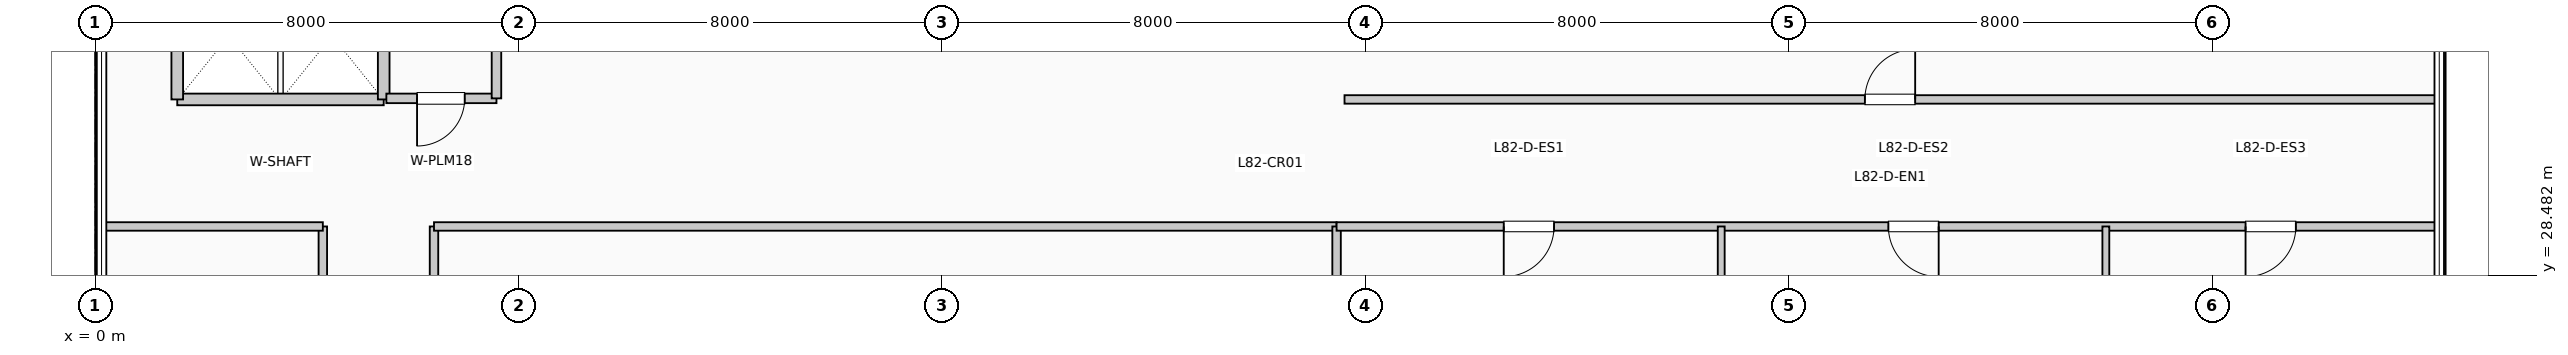
"""IFC4 building model, lengths in metres.
Left out: names, types, materials, properties, quantities, classifications, styles, units other than length and angle.
Written with IfcOpenShell. Run it as: python <this file> out.ifc"""

import sys

from ifc_helpers import new_model, si_unit, direction, frame, frame_2d, origin, place, context, subcontext, project, spatial, rectangle, extrude, element, fill, save


model = new_model("IFC4")
c1 = context("Model", 3, precision=1e-05, world=origin(), true_north=direction((0.0, 1.0)))
c2 = subcontext(c1, "Body", "Model", "MODEL_VIEW")
j1 = project(units=[si_unit("LENGTHUNIT", "METRE"), si_unit("PLANEANGLEUNIT", "RADIAN")], contexts=[c1])
p1 = place(None, origin())
s1 = spatial("IfcSite", under=j1, at=p1, CompositionType="ELEMENT")
p2 = place(p1, origin())
s2 = spatial("IfcBuilding", under=s1, at=p2, CompositionType="ELEMENT")
p3 = place(p2, frame((0.0, 0.0, 335.61)))
s3 = spatial("IfcBuildingStorey", under=s2, at=p3, CompositionType="ELEMENT", Elevation=335.61)
p4 = place(p3, frame((1.55, 31.8, 0.0), z_axis=(0.0, 0.0, 1.0), x_axis=(1.0, 0.0, 0.0)))
e1 = element("IfcWall", 1, at=p4, inside=s3, PredefinedType="PARTITIONING", context=c2, shape_type="SweptSolid", body=[
    extrude(rectangle(XDim=3.9, YDim=0.22, at=frame_2d((1.95, 0.0))), origin(), (0.0, 0.0, 1.0), 3.74),
])
for number, where, z_axis, x_axis in (
    (2, (1.55, 31.8, 0.0), (0.0, 0.0, 1.0), (0.0, 1.0, 0.0)),
    (3, (5.45, 31.8, 0.0), (0.0, 0.0, 1.0), (0.0, 1.0, 0.0)),
):
    element("IfcWall", number, at=place(p3, frame(where, z_axis=z_axis, x_axis=x_axis)), inside=s3, PredefinedType="PARTITIONING", context=c2, shape_type="SweptSolid", body=[
        extrude(rectangle(XDim=2.38, YDim=0.22, at=frame_2d((1.19, 0.0))), origin(), (0.0, 0.0, 1.0), 3.74),
    ])
p5 = place(p3, frame((5.5, 31.82, 0.0), z_axis=(0.0, 0.0, 1.0), x_axis=(1.0, 0.0, 0.0)))
e4 = element("IfcWall", 4, at=p5, inside=s3, PredefinedType="PLUMBINGWALL", context=c2, shape_type="SweptSolid", body=[
    extrude(rectangle(XDim=2.08, YDim=0.18, at=frame_2d((1.04, 0.0))), origin(), (0.0, 0.0, 1.0), 3.74),
])
p6 = place(p5, frame((1.48, 0.0, 0.0), z_axis=(0.0, 0.0, 1.0), x_axis=(-1.0, 0.0, 0.0)))
e5 = element("IfcOpeningElement", 5, at=p6, cuts=e4, PredefinedType="OPENING", context=c2, shape_type="SweptSolid", body=[
    extrude(rectangle(XDim=0.9, YDim=2.1, at=frame_2d((0.45, 1.05))), frame((0.0, 0.1, 0.0), z_axis=(0.0, -1.0, 0.0), x_axis=(1.0, 0.0, 0.0)), (0.0, 0.0, 1.0), 0.2),
])
p7 = place(p3, frame((7.58, 31.82, 0.0), z_axis=(0.0, 0.0, 1.0), x_axis=(0.0, 1.0, 0.0)))
e6 = element("IfcWall", 6, at=p7, inside=s3, PredefinedType="PLUMBINGWALL", context=c2, shape_type="SweptSolid", body=[
    extrude(rectangle(XDim=2.36, YDim=0.18, at=frame_2d((1.18, 0.0))), origin(), (0.0, 0.0, 1.0), 3.74),
])
p8 = place(p3, frame((4.3, 10.19, 0.0), z_axis=(0.0, 0.0, 1.0), x_axis=(0.0, 1.0, 0.0)))
e7 = element("IfcWall", 7, at=p8, inside=s3, PredefinedType="PARTITIONING", context=c2, shape_type="SweptSolid", body=[
    extrude(rectangle(XDim=19.21, YDim=0.16, at=frame_2d((9.605, 0.0))), origin(), (0.0, 0.0, 1.0), 3.74),
])
p9 = place(p8, frame((5.085, 0.0, 0.0), z_axis=(0.0, 0.0, 1.0), x_axis=(-1.0, 0.0, 0.0)))
e8 = element("IfcOpeningElement", 8, at=p9, cuts=e7, PredefinedType="OPENING", context=c2, shape_type="SweptSolid", body=[
    extrude(rectangle(XDim=0.95, YDim=2.15, at=frame_2d((0.475, 1.075))), frame((0.0, 0.09, 0.0), z_axis=(0.0, -1.0, 0.0), x_axis=(1.0, 0.0, 0.0)), (0.0, 0.0, 1.0), 0.18),
])
p10 = place(p8, frame((14.69, 0.0, 0.0), z_axis=(0.0, 0.0, 1.0), x_axis=(-1.0, 0.0, 0.0)))
e9 = element("IfcOpeningElement", 9, at=p10, cuts=e7, PredefinedType="OPENING", context=c2, shape_type="SweptSolid", body=[
    extrude(rectangle(XDim=0.95, YDim=2.15, at=frame_2d((0.475, 1.075))), frame((0.0, 0.09, 0.0), z_axis=(0.0, -1.0, 0.0), x_axis=(1.0, 0.0, 0.0)), (0.0, 0.0, 1.0), 0.18),
])
p11 = place(p3, frame((6.4, 10.19, 0.0), z_axis=(0.0, 0.0, 1.0), x_axis=(0.0, 1.0, 0.0)))
e10 = element("IfcWall", 10, at=p11, inside=s3, PredefinedType="PARTITIONING", context=c2, shape_type="SweptSolid", body=[
    extrude(rectangle(XDim=19.21, YDim=0.16, at=frame_2d((9.605, 0.0))), origin(), (0.0, 0.0, 1.0), 3.74),
])
p12 = place(p11, frame((1.35, 0.0, 0.0)))
e11 = element("IfcOpeningElement", 11, at=p12, cuts=e10, PredefinedType="OPENING", context=c2, shape_type="SweptSolid", body=[
    extrude(rectangle(XDim=0.95, YDim=2.15, at=frame_2d((0.475, 1.075))), frame((0.0, 0.09, 0.0), z_axis=(0.0, -1.0, 0.0), x_axis=(1.0, 0.0, 0.0)), (0.0, 0.0, 1.0), 0.18),
])
p13 = place(p11, frame((5.096, 0.0, 0.0)))
e12 = element("IfcOpeningElement", 12, at=p13, cuts=e10, PredefinedType="OPENING", context=c2, shape_type="SweptSolid", body=[
    extrude(rectangle(XDim=0.95, YDim=2.15, at=frame_2d((0.475, 1.075))), frame((0.0, 0.09, 0.0), z_axis=(0.0, -1.0, 0.0), x_axis=(1.0, 0.0, 0.0)), (0.0, 0.0, 1.0), 0.18),
])
p14 = place(p11, frame((9.034, 0.0, 0.0)))
e13 = element("IfcOpeningElement", 13, at=p14, cuts=e10, PredefinedType="OPENING", context=c2, shape_type="SweptSolid", body=[
    extrude(rectangle(XDim=0.95, YDim=2.15, at=frame_2d((0.475, 1.075))), frame((0.0, 0.09, 0.0), z_axis=(0.0, -1.0, 0.0), x_axis=(1.0, 0.0, 0.0)), (0.0, 0.0, 1.0), 0.18),
])
p15 = place(p11, frame((12.972, 0.0, 0.0)))
e14 = element("IfcOpeningElement", 14, at=p15, cuts=e10, PredefinedType="OPENING", context=c2, shape_type="SweptSolid", body=[
    extrude(rectangle(XDim=0.95, YDim=2.15, at=frame_2d((0.475, 1.075))), frame((0.0, 0.09, 0.0), z_axis=(0.0, -1.0, 0.0), x_axis=(1.0, 0.0, 0.0)), (0.0, 0.0, 1.0), 0.18),
])
p16 = place(p11, frame((16.814, 0.0, 0.0)))
e15 = element("IfcOpeningElement", 15, at=p16, cuts=e10, PredefinedType="OPENING", context=c2, shape_type="SweptSolid", body=[
    extrude(rectangle(XDim=0.95, YDim=2.15, at=frame_2d((0.475, 1.075))), frame((0.0, 0.09, 0.0), z_axis=(0.0, -1.0, 0.0), x_axis=(1.0, 0.0, 0.0)), (0.0, 0.0, 1.0), 0.18),
])
p17 = place(p3, frame((0.19, 29.4, 0.0), z_axis=(0.0, 0.0, 1.0), x_axis=(1.0, 0.0, 0.0)))
e16 = element("IfcWall", 16, at=p17, inside=s3, PredefinedType="PARTITIONING", context=c2, shape_type="SweptSolid", body=[
    extrude(rectangle(XDim=4.11, YDim=0.16, at=frame_2d((2.055, 0.0))), origin(), (0.0, 0.0, 1.0), 3.425),
])
p18 = place(p3, frame((6.4, 29.4, 0.0), z_axis=(0.0, 0.0, 1.0), x_axis=(1.0, 0.0, 0.0)))
e17 = element("IfcWall", 17, at=p18, inside=s3, PredefinedType="PARTITIONING", context=c2, shape_type="SweptSolid", body=[
    extrude(rectangle(XDim=17.05, YDim=0.16, at=frame_2d((8.525, 0.0))), origin(), (0.0, 0.0, 1.0), 3.425),
])
p19 = place(p3, frame((23.45, 5.99, 0.0), z_axis=(0.0, 0.0, 1.0), x_axis=(0.0, 1.0, 0.0)))
e18 = element("IfcWall", 18, at=p19, inside=s3, PredefinedType="PARTITIONING", context=c2, shape_type="SweptSolid", body=[
    extrude(rectangle(XDim=23.41, YDim=0.16, at=frame_2d((11.705, 0.0))), origin(), (0.0, 0.0, 1.0), 3.175),
])
p20 = place(p3, frame((23.45, 29.4, 0.0), z_axis=(0.0, 0.0, 1.0), x_axis=(1.0, 0.0, 0.0)))
e19 = element("IfcWall", 19, at=p20, inside=s3, PredefinedType="PARTITIONING", context=c2, shape_type="SweptSolid", body=[
    extrude(rectangle(XDim=20.76, YDim=0.16, at=frame_2d((10.38, 0.0))), origin(), (0.0, 0.0, 1.0), 3.425),
])
p21 = place(p20, frame((4.108, 0.0, 0.0), z_axis=(0.0, 0.0, 1.0), x_axis=(-1.0, 0.0, 0.0)))
e20 = element("IfcOpeningElement", 20, at=p21, cuts=e19, PredefinedType="OPENING", context=c2, shape_type="SweptSolid", body=[
    extrude(rectangle(XDim=0.95, YDim=2.15, at=frame_2d((0.475, 1.075))), frame((0.0, 0.09, 0.0), z_axis=(0.0, -1.0, 0.0), x_axis=(1.0, 0.0, 0.0)), (0.0, 0.0, 1.0), 0.18),
])
p22 = place(p20, frame((11.374, 0.0, 0.0), z_axis=(0.0, 0.0, 1.0), x_axis=(-1.0, 0.0, 0.0)))
e21 = element("IfcOpeningElement", 21, at=p22, cuts=e19, PredefinedType="OPENING", context=c2, shape_type="SweptSolid", body=[
    extrude(rectangle(XDim=0.95, YDim=2.15, at=frame_2d((0.475, 1.075))), frame((0.0, 0.09, 0.0), z_axis=(0.0, -1.0, 0.0), x_axis=(1.0, 0.0, 0.0)), (0.0, 0.0, 1.0), 0.18),
])
p23 = place(p20, frame((18.121, 0.0, 0.0), z_axis=(0.0, 0.0, 1.0), x_axis=(-1.0, 0.0, 0.0)))
e22 = element("IfcOpeningElement", 22, at=p23, cuts=e19, PredefinedType="OPENING", context=c2, shape_type="SweptSolid", body=[
    extrude(rectangle(XDim=0.95, YDim=2.15, at=frame_2d((0.475, 1.075))), frame((0.0, 0.09, 0.0), z_axis=(0.0, -1.0, 0.0), x_axis=(1.0, 0.0, 0.0)), (0.0, 0.0, 1.0), 0.18),
])
p24 = place(p3, frame((23.6, 31.8, 0.0), z_axis=(0.0, 0.0, 1.0), x_axis=(1.0, 0.0, 0.0)))
e23 = element("IfcWall", 23, at=p24, inside=s3, PredefinedType="PARTITIONING", context=c2, shape_type="SweptSolid", body=[
    extrude(rectangle(XDim=20.61, YDim=0.16, at=frame_2d((10.305, 0.0))), origin(), (0.0, 0.0, 1.0), 3.74),
])
p25 = place(p24, frame((9.83, 0.0, 0.0)))
e24 = element("IfcOpeningElement", 24, at=p25, cuts=e23, PredefinedType="OPENING", context=c2, shape_type="SweptSolid", body=[
    extrude(rectangle(XDim=0.95, YDim=2.15, at=frame_2d((0.475, 1.075))), frame((0.0, 0.09, 0.0), z_axis=(0.0, -1.0, 0.0), x_axis=(1.0, 0.0, 0.0)), (0.0, 0.0, 1.0), 0.18),
])
for number, where, z_axis, x_axis in (
    (25, (30.716, 25.19, 0.0), (0.0, 0.0, 1.0), (0.0, 1.0, 0.0)),
    (26, (37.982, 25.19, 0.0), (0.0, 0.0, 1.0), (0.0, 1.0, 0.0)),
):
    element("IfcWall", number, at=place(p3, frame(where, z_axis=z_axis, x_axis=x_axis)), inside=s3, PredefinedType="PARTITIONING", context=c2, shape_type="SweptSolid", body=[
        extrude(rectangle(XDim=4.21, YDim=0.13, at=frame_2d((2.105, 0.0))), origin(), (0.0, 0.0, 1.0), 3.74),
    ])
p26 = place(p6, origin())
e27 = element("IfcDoor", 27, at=p26, inside=s3, OperationType="SINGLE_SWING_LEFT", PredefinedType="DOOR", context=c2, shape_type="SweptSolid", body=[
    extrude(rectangle(XDim=0.9, YDim=2.1, at=frame_2d((0.45, 1.05))), frame((0.0, 0.025, 0.0), z_axis=(0.0, -1.0, 0.0), x_axis=(1.0, 0.0, 0.0)), (0.0, 0.0, 1.0), 0.05),
])
fill(e5, e27)
p27 = place(p21, origin())
e28 = element("IfcDoor", 28, at=p27, inside=s3, OperationType="SINGLE_SWING_LEFT", PredefinedType="DOOR", context=c2, shape_type="SweptSolid", body=[
    extrude(rectangle(XDim=0.95, YDim=2.15, at=frame_2d((0.475, 1.075))), frame((0.0, 0.025, 0.0), z_axis=(0.0, -1.0, 0.0), x_axis=(1.0, 0.0, 0.0)), (0.0, 0.0, 1.0), 0.05),
])
fill(e20, e28)
p28 = place(p22, origin())
e29 = element("IfcDoor", 29, at=p28, inside=s3, OperationType="SINGLE_SWING_RIGHT", PredefinedType="DOOR", context=c2, shape_type="SweptSolid", body=[
    extrude(rectangle(XDim=0.95, YDim=2.15, at=frame_2d((0.475, 1.075))), frame((0.0, 0.025, 0.0), z_axis=(0.0, -1.0, 0.0), x_axis=(1.0, 0.0, 0.0)), (0.0, 0.0, 1.0), 0.05),
])
fill(e21, e29)
p29 = place(p23, origin())
e30 = element("IfcDoor", 30, at=p29, inside=s3, OperationType="SINGLE_SWING_LEFT", PredefinedType="DOOR", context=c2, shape_type="SweptSolid", body=[
    extrude(rectangle(XDim=0.95, YDim=2.15, at=frame_2d((0.475, 1.075))), frame((0.0, 0.025, 0.0), z_axis=(0.0, -1.0, 0.0), x_axis=(1.0, 0.0, 0.0)), (0.0, 0.0, 1.0), 0.05),
])
fill(e22, e30)
p30 = place(p25, origin())
e31 = element("IfcDoor", 31, at=p30, inside=s3, OperationType="SINGLE_SWING_RIGHT", PredefinedType="DOOR", context=c2, shape_type="SweptSolid", body=[
    extrude(rectangle(XDim=0.95, YDim=2.15, at=frame_2d((0.475, 1.075))), frame((0.0, 0.025, 0.0), z_axis=(0.0, -1.0, 0.0), x_axis=(1.0, 0.0, 0.0)), (0.0, 0.0, 1.0), 0.05),
])
fill(e24, e31)
save(model, sys.argv[1])
